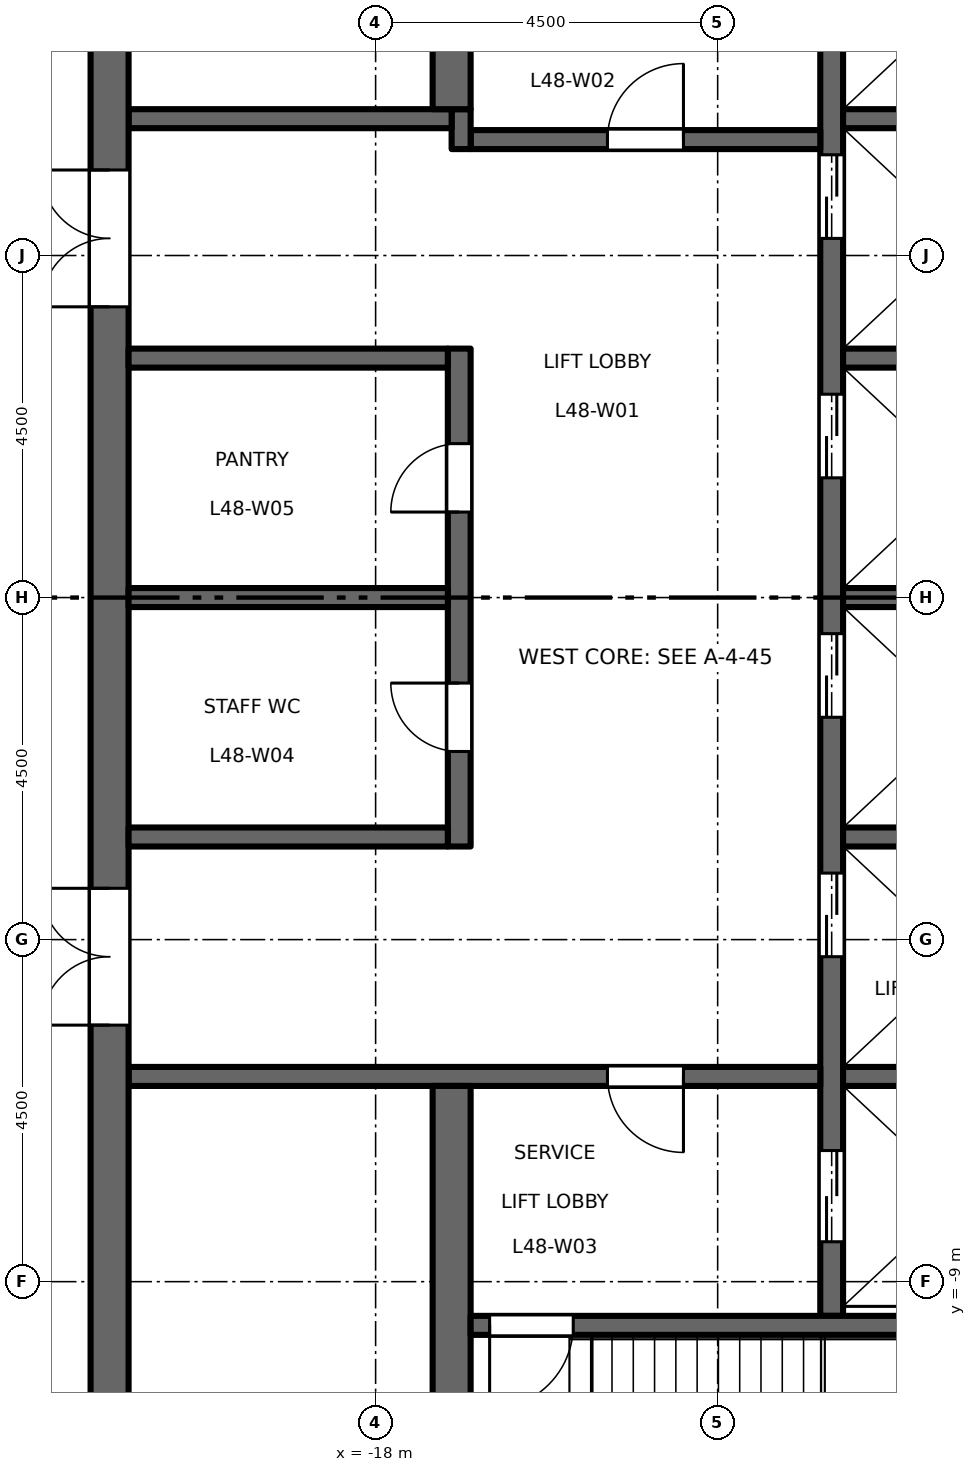
"""IFC4 building model, lengths in metres.
Left out: names, types, materials, properties, quantities, classifications, styles, units other than length and angle.
Written with IfcOpenShell. Run it as: python <this file> out.ifc"""

import sys

from ifc_helpers import new_model, si_unit, direction, frame, frame_2d, origin, place, context, subcontext, project, spatial, rectangle, extrude, element, fill, save


model = new_model("IFC4")
c1 = context("Model", 3, precision=1e-05, world=origin(), true_north=direction((0.0, 1.0)))
c2 = subcontext(c1, "Body", "Model", "MODEL_VIEW")
j1 = project(units=[si_unit("LENGTHUNIT", "METRE"), si_unit("PLANEANGLEUNIT", "RADIAN")], contexts=[c1])
p1 = place(None, origin())
s1 = spatial("IfcSite", under=j1, at=p1, CompositionType="ELEMENT")
p2 = place(p1, origin())
s2 = spatial("IfcBuilding", under=s1, at=p2, CompositionType="ELEMENT")
p3 = place(p2, frame((0.0, 0.0, 224.2)))
s3 = spatial("IfcBuildingStorey", under=s2, at=p3, CompositionType="ELEMENT", Elevation=224.2)
p4 = place(p3, frame((-12.0, -9.45, 0.0), z_axis=(0.0, 0.0, 1.0), x_axis=(0.0, 1.0, 0.0)))
e1 = element("IfcWall", 1, at=p4, inside=s3, PredefinedType="SHEAR", context=c2, shape_type="SweptSolid", body=[
    extrude(rectangle(XDim=18.9, YDim=0.3, at=frame_2d((9.45, 0.0))), origin(), (0.0, 0.0, 1.0), 4.35),
])
p5 = place(p4, frame((4.725, 0.0, 0.0)))
e2 = element("IfcOpeningElement", 2, at=p5, cuts=e1, PredefinedType="OPENING", context=c2, shape_type="SweptSolid", body=[
    extrude(rectangle(XDim=1.1, YDim=2.1, at=frame_2d((0.55, 1.05))), frame((0.0, 0.16, 0.0), z_axis=(0.0, -1.0, 0.0), x_axis=(1.0, 0.0, 0.0)), (0.0, 0.0, 1.0), 0.32),
])
p6 = place(p4, frame((7.875, 0.0, 0.0)))
e3 = element("IfcOpeningElement", 3, at=p6, cuts=e1, PredefinedType="OPENING", context=c2, shape_type="SweptSolid", body=[
    extrude(rectangle(XDim=1.1, YDim=2.1, at=frame_2d((0.55, 1.05))), frame((0.0, 0.16, 0.0), z_axis=(0.0, -1.0, 0.0), x_axis=(1.0, 0.0, 0.0)), (0.0, 0.0, 1.0), 0.32),
])
p7 = place(p4, frame((11.025, 0.0, 0.0)))
e4 = element("IfcOpeningElement", 4, at=p7, cuts=e1, PredefinedType="OPENING", context=c2, shape_type="SweptSolid", body=[
    extrude(rectangle(XDim=1.1, YDim=2.1, at=frame_2d((0.55, 1.05))), frame((0.0, 0.16, 0.0), z_axis=(0.0, -1.0, 0.0), x_axis=(1.0, 0.0, 0.0)), (0.0, 0.0, 1.0), 0.32),
])
p8 = place(p4, frame((14.175, 0.0, 0.0)))
e5 = element("IfcOpeningElement", 5, at=p8, cuts=e1, PredefinedType="OPENING", context=c2, shape_type="SweptSolid", body=[
    extrude(rectangle(XDim=1.1, YDim=2.1, at=frame_2d((0.55, 1.05))), frame((0.0, 0.16, 0.0), z_axis=(0.0, -1.0, 0.0), x_axis=(1.0, 0.0, 0.0)), (0.0, 0.0, 1.0), 0.32),
])
p9 = place(p4, frame((16.725, 0.0, 0.0)))
e6 = element("IfcOpeningElement", 6, at=p9, cuts=e1, PredefinedType="OPENING", context=c2, shape_type="SweptSolid", body=[
    extrude(rectangle(XDim=1.2, YDim=2.1, at=frame_2d((0.6, 1.05))), frame((0.0, 0.16, 0.0), z_axis=(0.0, -1.0, 0.0), x_axis=(1.0, 0.0, 0.0)), (0.0, 0.0, 1.0), 0.32),
])
p10 = place(p4, frame((0.975, 0.0, 0.0)))
e7 = element("IfcOpeningElement", 7, at=p10, cuts=e1, PredefinedType="OPENING", context=c2, shape_type="SweptSolid", body=[
    extrude(rectangle(XDim=1.2, YDim=2.1, at=frame_2d((0.6, 1.05))), frame((0.0, 0.16, 0.0), z_axis=(0.0, -1.0, 0.0), x_axis=(1.0, 0.0, 0.0)), (0.0, 0.0, 1.0), 0.32),
])
p11 = place(p3, frame((-12.15, 6.025, 0.0), z_axis=(0.0, 0.0, 1.0), x_axis=(-1.0, 0.0, 0.0)))
e8 = element("IfcWall", 8, at=p11, inside=s3, PredefinedType="SHEAR", context=c2, shape_type="SweptSolid", body=[
    extrude(rectangle(XDim=4.6, YDim=0.25, at=frame_2d((2.3, 0.0))), origin(), (0.0, 0.0, 1.0), 4.35),
])
p12 = place(p11, frame((1.8, 0.0, 0.0)))
e9 = element("IfcOpeningElement", 9, at=p12, cuts=e8, PredefinedType="OPENING", context=c2, shape_type="SweptSolid", body=[
    extrude(rectangle(XDim=1.0, YDim=2.1, at=frame_2d((0.5, 1.05))), frame((0.0, 0.135, 0.0), z_axis=(0.0, -1.0, 0.0), x_axis=(1.0, 0.0, 0.0)), (0.0, 0.0, 1.0), 0.27),
])
p13 = place(p3, frame((-16.875, 5.9, 0.0), z_axis=(0.0, 0.0, 1.0), x_axis=(0.0, 1.0, 0.0)))
e10 = element("IfcWall", 10, at=p13, inside=s3, PredefinedType="SHEAR", context=c2, shape_type="SweptSolid", body=[
    extrude(rectangle(XDim=0.525, YDim=0.25, at=frame_2d((0.263, 0.0))), origin(), (0.0, 0.0, 1.0), 4.35),
])
p14 = place(p3, frame((-17.0, 6.3, 0.0), z_axis=(0.0, 0.0, 1.0), x_axis=(-1.0, 0.0, 0.0)))
e11 = element("IfcWall", 11, at=p14, inside=s3, PredefinedType="SHEAR", context=c2, shape_type="SweptSolid", body=[
    extrude(rectangle(XDim=4.25, YDim=0.25, at=frame_2d((2.125, 0.0))), origin(), (0.0, 0.0, 1.0), 4.35),
])
p15 = place(p3, frame((-12.15, -6.3, 0.0), z_axis=(0.0, 0.0, 1.0), x_axis=(-1.0, 0.0, 0.0)))
e12 = element("IfcWall", 12, at=p15, inside=s3, PredefinedType="SHEAR", context=c2, shape_type="SweptSolid", body=[
    extrude(rectangle(XDim=9.1, YDim=0.25, at=frame_2d((4.55, 0.0))), origin(), (0.0, 0.0, 1.0), 4.35),
])
p16 = place(p15, frame((1.8, 0.0, 0.0)))
e13 = element("IfcOpeningElement", 13, at=p16, cuts=e12, PredefinedType="OPENING", context=c2, shape_type="SweptSolid", body=[
    extrude(rectangle(XDim=1.0, YDim=2.1, at=frame_2d((0.5, 1.05))), frame((0.0, 0.135, 0.0), z_axis=(0.0, -1.0, 0.0), x_axis=(1.0, 0.0, 0.0)), (0.0, 0.0, 1.0), 0.27),
])
p17 = place(p3, frame((-21.5, -13.0, 0.0), z_axis=(0.0, 0.0, 1.0), x_axis=(0.0, 1.0, 0.0)))
e14 = element("IfcWall", 14, at=p17, inside=s3, PredefinedType="SHEAR", context=c2, shape_type="SweptSolid", body=[
    extrude(rectangle(XDim=26.0, YDim=0.5, at=frame_2d((13.0, 0.0))), origin(), (0.0, 0.0, 1.0), 4.35),
])
p18 = place(p17, frame((16.825, 0.0, 0.0)))
e15 = element("IfcOpeningElement", 15, at=p18, cuts=e14, PredefinedType="OPENING", context=c2, shape_type="SweptSolid", body=[
    extrude(rectangle(XDim=1.8, YDim=2.1, at=frame_2d((0.9, 1.05))), frame((0.0, 0.26, 0.0), z_axis=(0.0, -1.0, 0.0), x_axis=(1.0, 0.0, 0.0)), (0.0, 0.0, 1.0), 0.52),
])
p19 = place(p17, frame((7.375, 0.0, 0.0)))
e16 = element("IfcOpeningElement", 16, at=p19, cuts=e14, PredefinedType="OPENING", context=c2, shape_type="SweptSolid", body=[
    extrude(rectangle(XDim=1.8, YDim=2.1, at=frame_2d((0.9, 1.05))), frame((0.0, 0.26, 0.0), z_axis=(0.0, -1.0, 0.0), x_axis=(1.0, 0.0, 0.0)), (0.0, 0.0, 1.0), 0.52),
])
p20 = place(p3, frame((-16.9, -3.275, 0.0), z_axis=(0.0, 0.0, 1.0), x_axis=(0.0, 1.0, 0.0)))
e17 = element("IfcWall", 17, at=p20, inside=s3, PredefinedType="SHEAR", context=c2, shape_type="SweptSolid", body=[
    extrude(rectangle(XDim=6.55, YDim=0.3, at=frame_2d((3.275, 0.0))), origin(), (0.0, 0.0, 1.0), 4.35),
])
p21 = place(p20, frame((1.25, 0.0, 0.0)))
e18 = element("IfcOpeningElement", 18, at=p21, cuts=e17, PredefinedType="OPENING", context=c2, shape_type="SweptSolid", body=[
    extrude(rectangle(XDim=0.9, YDim=2.1, at=frame_2d((0.45, 1.05))), frame((0.0, 0.16, 0.0), z_axis=(0.0, -1.0, 0.0), x_axis=(1.0, 0.0, 0.0)), (0.0, 0.0, 1.0), 0.32),
])
p22 = place(p20, frame((4.4, 0.0, 0.0)))
e19 = element("IfcOpeningElement", 19, at=p22, cuts=e17, PredefinedType="OPENING", context=c2, shape_type="SweptSolid", body=[
    extrude(rectangle(XDim=0.9, YDim=2.1, at=frame_2d((0.45, 1.05))), frame((0.0, 0.16, 0.0), z_axis=(0.0, -1.0, 0.0), x_axis=(1.0, 0.0, 0.0)), (0.0, 0.0, 1.0), 0.32),
])
for number, where, z_axis, x_axis in (
    (20, (-17.05, 0.0, 0.0), (0.0, 0.0, 1.0), (-1.0, 0.0, 0.0)),
    (21, (-17.05, 3.15, 0.0), (0.0, 0.0, 1.0), (-1.0, 0.0, 0.0)),
    (22, (-17.05, -3.15, 0.0), (0.0, 0.0, 1.0), (-1.0, 0.0, 0.0)),
):
    element("IfcWall", number, at=place(p3, frame(where, z_axis=z_axis, x_axis=x_axis)), inside=s3, PredefinedType="SHEAR", context=c2, shape_type="SweptSolid", body=[
        extrude(rectangle(XDim=4.2, YDim=0.25, at=frame_2d((2.1, 0.0))), origin(), (0.0, 0.0, 1.0), 4.35),
    ])
for number, where, z_axis, x_axis in (
    (23, (-17.0, 6.425, 0.0), (0.0, 0.0, 1.0), (0.0, 1.0, 0.0)),
    (24, (-17.0, -13.0, 0.0), (0.0, 0.0, 1.0), (0.0, 1.0, 0.0)),
):
    element("IfcWall", number, at=place(p3, frame(where, z_axis=z_axis, x_axis=x_axis)), inside=s3, PredefinedType="SHEAR", context=c2, shape_type="SweptSolid", body=[
        extrude(rectangle(XDim=6.575, YDim=0.5, at=frame_2d((3.288, 0.0))), origin(), (0.0, 0.0, 1.0), 4.35),
    ])
for number, where, z_axis, x_axis in (
    (25, (-8.75, 0.0, 0.0), (0.0, 0.0, 1.0), (-1.0, 0.0, 0.0)),
    (26, (-8.75, 3.15, 0.0), (0.0, 0.0, 1.0), (-1.0, 0.0, 0.0)),
    (27, (-8.75, 6.3, 0.0), (0.0, 0.0, 1.0), (-1.0, 0.0, 0.0)),
    (28, (-8.75, -3.15, 0.0), (0.0, 0.0, 1.0), (-1.0, 0.0, 0.0)),
    (29, (-8.75, -6.3, 0.0), (0.0, 0.0, 1.0), (-1.0, 0.0, 0.0)),
):
    element("IfcWall", number, at=place(p3, frame(where, z_axis=z_axis, x_axis=x_axis)), inside=s3, PredefinedType="SHEAR", context=c2, shape_type="SweptSolid", body=[
        extrude(rectangle(XDim=3.1, YDim=0.25, at=frame_2d((1.55, 0.0))), origin(), (0.0, 0.0, 1.0), 4.35),
    ])
p23 = place(p3, frame((-8.75, -9.575, 0.0), z_axis=(0.0, 0.0, 1.0), x_axis=(-1.0, 0.0, 0.0)))
e30 = element("IfcWall", 30, at=p23, inside=s3, PredefinedType="SHEAR", context=c2, shape_type="SweptSolid", body=[
    extrude(rectangle(XDim=8.0, YDim=0.25, at=frame_2d((4.0, 0.0))), origin(), (0.0, 0.0, 1.0), 4.35),
])
p24 = place(p23, frame((6.65, 0.0, 0.0)))
e31 = element("IfcOpeningElement", 31, at=p24, cuts=e30, PredefinedType="OPENING", context=c2, shape_type="SweptSolid", body=[
    extrude(rectangle(XDim=1.1, YDim=2.1, at=frame_2d((0.55, 1.05))), frame((0.0, 0.135, 0.0), z_axis=(0.0, -1.0, 0.0), x_axis=(1.0, 0.0, 0.0)), (0.0, 0.0, 1.0), 0.27),
])
p25 = place(p12, origin())
e32 = element("IfcDoor", 32, at=p25, inside=s3, OperationType="SINGLE_SWING_LEFT", PredefinedType="DOOR", context=c2, shape_type="SweptSolid", body=[
    extrude(rectangle(XDim=1.0, YDim=2.1, at=frame_2d((0.5, 1.05))), frame((0.0, 0.025, 0.0), z_axis=(0.0, -1.0, 0.0), x_axis=(1.0, 0.0, 0.0)), (0.0, 0.0, 1.0), 0.05),
])
fill(e9, e32)
p26 = place(p16, origin())
e33 = element("IfcDoor", 33, at=p26, inside=s3, OperationType="SINGLE_SWING_RIGHT", PredefinedType="DOOR", context=c2, shape_type="SweptSolid", body=[
    extrude(rectangle(XDim=1.0, YDim=2.1, at=frame_2d((0.5, 1.05))), frame((0.0, 0.025, 0.0), z_axis=(0.0, -1.0, 0.0), x_axis=(1.0, 0.0, 0.0)), (0.0, 0.0, 1.0), 0.05),
])
fill(e13, e33)
p27 = place(p24, origin())
e34 = element("IfcDoor", 34, at=p27, inside=s3, OperationType="SINGLE_SWING_LEFT", PredefinedType="DOOR", context=c2, shape_type="SweptSolid", body=[
    extrude(rectangle(XDim=1.1, YDim=2.1, at=frame_2d((0.55, 1.05))), frame((0.0, 0.025, 0.0), z_axis=(0.0, -1.0, 0.0), x_axis=(1.0, 0.0, 0.0)), (0.0, 0.0, 1.0), 0.05),
])
fill(e31, e34)
p28 = place(p18, origin())
e35 = element("IfcDoor", 35, at=p28, inside=s3, OperationType="DOUBLE_DOOR_DOUBLE_SWING", PredefinedType="DOOR", context=c2, shape_type="SweptSolid", body=[
    extrude(rectangle(XDim=1.8, YDim=2.1, at=frame_2d((0.9, 1.05))), frame((0.0, 0.025, 0.0), z_axis=(0.0, -1.0, 0.0), x_axis=(1.0, 0.0, 0.0)), (0.0, 0.0, 1.0), 0.05),
])
fill(e15, e35)
p29 = place(p19, origin())
e36 = element("IfcDoor", 36, at=p29, inside=s3, OperationType="DOUBLE_DOOR_DOUBLE_SWING", PredefinedType="DOOR", context=c2, shape_type="SweptSolid", body=[
    extrude(rectangle(XDim=1.8, YDim=2.1, at=frame_2d((0.9, 1.05))), frame((0.0, 0.025, 0.0), z_axis=(0.0, -1.0, 0.0), x_axis=(1.0, 0.0, 0.0)), (0.0, 0.0, 1.0), 0.05),
])
fill(e16, e36)
p30 = place(p5, origin())
e37 = element("IfcDoor", 37, at=p30, inside=s3, OperationType="DOUBLE_DOOR_SLIDING", PredefinedType="DOOR", context=c2, shape_type="SweptSolid", body=[
    extrude(rectangle(XDim=1.1, YDim=2.1, at=frame_2d((0.55, 1.05))), frame((0.0, 0.025, 0.0), z_axis=(0.0, -1.0, 0.0), x_axis=(1.0, 0.0, 0.0)), (0.0, 0.0, 1.0), 0.05),
])
fill(e2, e37)
p31 = place(p6, origin())
e38 = element("IfcDoor", 38, at=p31, inside=s3, OperationType="DOUBLE_DOOR_SLIDING", PredefinedType="DOOR", context=c2, shape_type="SweptSolid", body=[
    extrude(rectangle(XDim=1.1, YDim=2.1, at=frame_2d((0.55, 1.05))), frame((0.0, 0.025, 0.0), z_axis=(0.0, -1.0, 0.0), x_axis=(1.0, 0.0, 0.0)), (0.0, 0.0, 1.0), 0.05),
])
fill(e3, e38)
p32 = place(p7, origin())
e39 = element("IfcDoor", 39, at=p32, inside=s3, OperationType="DOUBLE_DOOR_SLIDING", PredefinedType="DOOR", context=c2, shape_type="SweptSolid", body=[
    extrude(rectangle(XDim=1.1, YDim=2.1, at=frame_2d((0.55, 1.05))), frame((0.0, 0.025, 0.0), z_axis=(0.0, -1.0, 0.0), x_axis=(1.0, 0.0, 0.0)), (0.0, 0.0, 1.0), 0.05),
])
fill(e4, e39)
p33 = place(p8, origin())
e40 = element("IfcDoor", 40, at=p33, inside=s3, OperationType="DOUBLE_DOOR_SLIDING", PredefinedType="DOOR", context=c2, shape_type="SweptSolid", body=[
    extrude(rectangle(XDim=1.1, YDim=2.1, at=frame_2d((0.55, 1.05))), frame((0.0, 0.025, 0.0), z_axis=(0.0, -1.0, 0.0), x_axis=(1.0, 0.0, 0.0)), (0.0, 0.0, 1.0), 0.05),
])
fill(e5, e40)
p34 = place(p10, origin())
e41 = element("IfcDoor", 41, at=p34, inside=s3, OperationType="DOUBLE_DOOR_SLIDING", PredefinedType="DOOR", context=c2, shape_type="SweptSolid", body=[
    extrude(rectangle(XDim=1.2, YDim=2.1, at=frame_2d((0.6, 1.05))), frame((0.0, 0.025, 0.0), z_axis=(0.0, -1.0, 0.0), x_axis=(1.0, 0.0, 0.0)), (0.0, 0.0, 1.0), 0.05),
])
fill(e7, e41)
p35 = place(p21, origin())
e42 = element("IfcDoor", 42, at=p35, inside=s3, OperationType="SINGLE_SWING_LEFT", PredefinedType="DOOR", context=c2, shape_type="SweptSolid", body=[
    extrude(rectangle(XDim=0.9, YDim=2.1, at=frame_2d((0.45, 1.05))), frame((0.0, 0.025, 0.0), z_axis=(0.0, -1.0, 0.0), x_axis=(1.0, 0.0, 0.0)), (0.0, 0.0, 1.0), 0.05),
])
fill(e18, e42)
p36 = place(p22, origin())
e43 = element("IfcDoor", 43, at=p36, inside=s3, OperationType="SINGLE_SWING_RIGHT", PredefinedType="DOOR", context=c2, shape_type="SweptSolid", body=[
    extrude(rectangle(XDim=0.9, YDim=2.1, at=frame_2d((0.45, 1.05))), frame((0.0, 0.025, 0.0), z_axis=(0.0, -1.0, 0.0), x_axis=(1.0, 0.0, 0.0)), (0.0, 0.0, 1.0), 0.05),
])
fill(e19, e43)
save(model, sys.argv[1])
